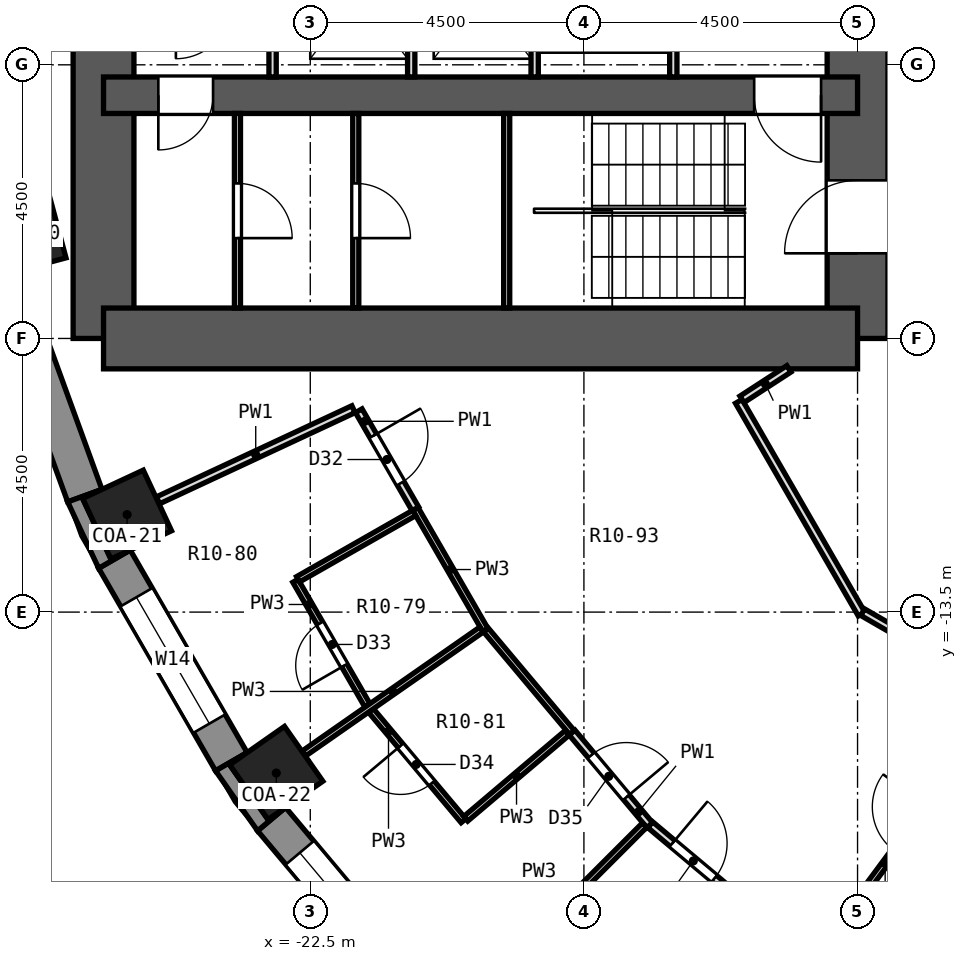
"""IFC4 building model, lengths in metres.
Left out: names, types, materials, properties, quantities, classifications, styles, units other than length and angle.
Written with IfcOpenShell. Run it as: python <this file> out.ifc"""

import sys

from ifc_helpers import new_model, si_unit, direction, frame, frame_2d, origin, origin_2d, place, context, subcontext, project, spatial, polyline, rectangle, outline, extrude, element, fill, save


model = new_model("IFC4")
c1 = context("Model", 3, precision=1e-05, world=origin(), true_north=direction((0.0, 1.0)))
c2 = subcontext(c1, "Body", "Model", "MODEL_VIEW")
j1 = project(units=[si_unit("LENGTHUNIT", "METRE"), si_unit("PLANEANGLEUNIT", "RADIAN")], contexts=[c1])
p1 = place(None, origin())
s1 = spatial("IfcSite", under=j1, at=p1, CompositionType="ELEMENT")
p2 = place(p1, origin())
s2 = spatial("IfcBuilding", under=s1, at=p2, CompositionType="ELEMENT")
p3 = place(p2, frame((0.0, 0.0, 36.2)))
s3 = spatial("IfcBuildingStorey", under=s2, at=p3, CompositionType="ELEMENT", Elevation=36.2)
for number, where, z_axis, x_axis in (
    (1, (-27.191, -7.286, 0.0), (0.0, 0.0, 1.0), (-0.966, -0.259, 0.0)),
    (2, (-25.512, -11.897, 0.0), (0.0, 0.0, 1.0), (-0.906, -0.423, 0.0)),
    (3, (-23.059, -16.146, 0.0), (0.0, 0.0, 1.0), (-0.819, -0.574, 0.0)),
):
    element("IfcColumn", number, at=place(p3, frame(where, z_axis=z_axis, x_axis=x_axis)), inside=s3, PredefinedType="COLUMN", context=c2, shape_type="SweptSolid", body=[
        extrude(rectangle(XDim=1.1, YDim=1.1, at=origin_2d()), origin(), (0.0, 0.0, 1.0), 3.3),
    ])
p4 = place(p3, frame((-13.5, -9.0, 0.0), z_axis=(0.0, 0.0, 1.0), x_axis=(0.0, 1.0, 0.0)))
e4 = element("IfcWall", 4, at=p4, inside=s3, PredefinedType="SHEAR", context=c2, shape_type="SweptSolid", body=[
    extrude(rectangle(XDim=18.0, YDim=1.0, at=frame_2d((9.0, 0.0))), origin(), (0.0, 0.0, 1.0), 3.3),
])
p5 = place(p4, frame((15.4, 0.0, 0.0)))
e5 = element("IfcOpeningElement", 5, at=p5, cuts=e4, PredefinedType="OPENING", context=c2, shape_type="SweptSolid", body=[
    extrude(rectangle(XDim=1.2, YDim=2.1, at=frame_2d((0.6, 1.05))), frame((0.0, 0.512, 0.0), z_axis=(0.0, -1.0, 0.0), x_axis=(1.0, 0.0, 0.0)), (0.0, 0.0, 1.0), 1.024),
])
p6 = place(p4, frame((1.4, 0.0, 0.0)))
e6 = element("IfcOpeningElement", 6, at=p6, cuts=e4, PredefinedType="OPENING", context=c2, shape_type="SweptSolid", body=[
    extrude(rectangle(XDim=1.2, YDim=2.1, at=frame_2d((0.6, 1.05))), frame((0.0, 0.512, 0.0), z_axis=(0.0, -1.0, 0.0), x_axis=(1.0, 0.0, 0.0)), (0.0, 0.0, 1.0), 1.024),
])
p7 = place(p4, frame((7.5, 0.0, 0.0)))
e7 = element("IfcOpeningElement", 7, at=p7, cuts=e4, PredefinedType="OPENING", context=c2, shape_type="SweptSolid", body=[
    extrude(rectangle(XDim=3.0, YDim=2.4, at=frame_2d((1.5, 1.2))), frame((0.0, 0.512, 0.0), z_axis=(0.0, -1.0, 0.0), x_axis=(1.0, 0.0, 0.0)), (0.0, 0.0, 1.0), 1.024),
])
p8 = place(p3, frame((-25.9, -9.0, 0.0), z_axis=(0.0, 0.0, 1.0), x_axis=(0.0, 1.0, 0.0)))
e8 = element("IfcWall", 8, at=p8, inside=s3, PredefinedType="SHEAR", context=c2, shape_type="SweptSolid", body=[
    extrude(rectangle(XDim=18.0, YDim=1.0, at=frame_2d((9.0, 0.0))), origin(), (0.0, 0.0, 1.0), 3.3),
])
p9 = place(p3, frame((-13.5, -9.0, 0.0), z_axis=(0.0, 0.0, 1.0), x_axis=(-1.0, 0.0, 0.0)))
e9 = element("IfcWall", 9, at=p9, inside=s3, PredefinedType="SHEAR", context=c2, shape_type="SweptSolid", body=[
    extrude(rectangle(XDim=12.4, YDim=1.0, at=frame_2d((6.2, 0.0))), origin(), (0.0, 0.0, 1.0), 3.3),
])
p10 = place(p3, frame((-13.5, -5.0, 0.0), z_axis=(0.0, 0.0, 1.0), x_axis=(-1.0, 0.0, 0.0)))
e10 = element("IfcWall", 10, at=p10, inside=s3, PredefinedType="SHEAR", context=c2, shape_type="SweptSolid", body=[
    extrude(rectangle(XDim=12.4, YDim=0.6, at=frame_2d((6.2, 0.0))), origin(), (0.0, 0.0, 1.0), 3.3),
])
p11 = place(p10, frame((10.599, 0.0, 0.0)))
e11 = element("IfcOpeningElement", 11, at=p11, cuts=e10, PredefinedType="OPENING", context=c2, shape_type="SweptSolid", body=[
    extrude(rectangle(XDim=0.9, YDim=2.1, at=frame_2d((0.45, 1.05))), frame((0.0, 0.312, 0.0), z_axis=(0.0, -1.0, 0.0), x_axis=(1.0, 0.0, 0.0)), (0.0, 0.0, 1.0), 0.624),
])
p12 = place(p10, frame((0.6, 0.0, 0.0)))
e12 = element("IfcOpeningElement", 12, at=p12, cuts=e10, PredefinedType="OPENING", context=c2, shape_type="SweptSolid", body=[
    extrude(rectangle(XDim=1.1, YDim=2.1, at=frame_2d((0.55, 1.05))), frame((0.0, 0.312, 0.0), z_axis=(0.0, -1.0, 0.0), x_axis=(1.0, 0.0, 0.0)), (0.0, 0.0, 1.0), 0.624),
])
p13 = place(p3, frame((-27.523, -7.971, 0.0), z_axis=(0.0, 0.0, 1.0), x_axis=(0.342028474173, -0.939689588564, 0.0)))
e13 = element("IfcWall", 13, at=p13, inside=s3, PredefinedType="SOLIDWALL", context=c2, shape_type="SweptSolid", body=[
    extrude(rectangle(XDim=3.846, YDim=0.6, at=frame_2d((1.923, 0.0))), origin(), (0.0, 0.0, 1.0), 2.75),
])
p14 = place(p3, frame((-25.721, -12.63, 0.0), z_axis=(0.0, 0.0, 1.0), x_axis=(0.499989888488, -0.86603124159, 0.0)))
e14 = element("IfcWall", 14, at=p14, inside=s3, PredefinedType="SOLIDWALL", context=c2, shape_type="SweptSolid", body=[
    extrude(rectangle(XDim=3.846, YDim=0.6, at=frame_2d((1.923, 0.0))), origin(), (0.0, 0.0, 1.0), 2.75),
])
p15 = place(p14, frame((0.723, 0.0, 0.9)))
e15 = element("IfcOpeningElement", 15, at=p15, cuts=e14, PredefinedType="OPENING", context=c2, shape_type="SweptSolid", body=[
    extrude(rectangle(XDim=2.4, YDim=1.8, at=frame_2d((1.2, 0.9))), frame((0.0, 0.312, 0.0), z_axis=(0.0, -1.0, 0.0), x_axis=(1.0, 0.0, 0.0)), (0.0, 0.0, 1.0), 0.624),
])
p16 = place(p3, frame((-23.137, -16.904, 0.0), z_axis=(0.0, 0.0, 1.0), x_axis=(0.642809392687, -0.766026164483, 0.0)))
e16 = element("IfcWall", 16, at=p16, inside=s3, PredefinedType="SOLIDWALL", context=c2, shape_type="SweptSolid", body=[
    extrude(rectangle(XDim=3.846, YDim=0.6, at=frame_2d((1.923, 0.0))), origin(), (0.0, 0.0, 1.0), 2.75),
])
p17 = place(p16, frame((0.723, 0.0, 0.9)))
e17 = element("IfcOpeningElement", 17, at=p17, cuts=e16, PredefinedType="OPENING", context=c2, shape_type="SweptSolid", body=[
    extrude(rectangle(XDim=2.4, YDim=1.8, at=frame_2d((1.2, 0.9))), frame((0.0, 0.312, 0.0), z_axis=(0.0, -1.0, 0.0), x_axis=(1.0, 0.0, 0.0)), (0.0, 0.0, 1.0), 0.624),
])
p18 = place(p3, origin())
e18 = element("IfcWall", 18, at=p18, inside=s3, PredefinedType="SOLIDWALL", context=c2, shape_type="SweptSolid", body=[
    extrude(outline(polyline([(-25.981, -12.78), (-25.461, -12.479), (-25.779, -12.628), (-26.243, -11.631), (-25.926, -11.483), (-26.49, -11.688), (-25.981, -12.78)])), origin(), (0.0, 0.0, 1.0), 2.75),
])
p19 = place(p3, origin())
e19 = element("IfcWall", 19, at=p19, inside=s3, PredefinedType="SOLIDWALL", context=c2, shape_type="SweptSolid", body=[
    extrude(outline(polyline([(-24.058, -16.11), (-23.367, -17.097), (-22.907, -16.711), (-23.194, -16.912), (-23.825, -16.011), (-23.538, -15.81), (-24.058, -16.11)])), origin(), (0.0, 0.0, 1.0), 2.75),
])
p20 = place(p3, frame((-22.744, -12.985, 0.0), z_axis=(0.0, 0.0, 1.0), x_axis=(0.499987246797, -0.866032766724, 0.0)))
e20 = element("IfcWall", 20, at=p20, inside=s3, PredefinedType="PARTITIONING", context=c2, shape_type="SweptSolid", body=[
    extrude(rectangle(XDim=2.368, YDim=0.1, at=frame_2d((1.184, 0.0))), origin(), (0.0, 0.0, 1.0), 2.75),
])
p21 = place(p20, frame((0.809, 0.0, 0.0)))
e21 = element("IfcOpeningElement", 21, at=p21, cuts=e20, PredefinedType="OPENING", context=c2, shape_type="SweptSolid", body=[
    extrude(rectangle(XDim=0.8, YDim=2.1, at=frame_2d((0.4, 1.05))), frame((0.0, 0.062, 0.0), z_axis=(0.0, -1.0, 0.0), x_axis=(1.0, 0.0, 0.0)), (0.0, 0.0, 1.0), 0.124),
])
p22 = place(p3, frame((-20.772, -11.802, 0.0), z_axis=(0.0, 0.0, 1.0), x_axis=(0.500055369823, -0.865993433642, 0.0)))
e22 = element("IfcWall", 22, at=p22, inside=s3, PredefinedType="PARTITIONING", context=c2, shape_type="SweptSolid", body=[
    extrude(rectangle(XDim=2.306, YDim=0.1, at=frame_2d((1.153, 0.0))), origin(), (0.0, 0.0, 1.0), 2.75),
])
p23 = place(p3, frame((-21.703, -10.189, 0.0), z_axis=(0.0, 0.0, 1.0), x_axis=(0.499862453367, -0.866104801807, 0.0)))
e23 = element("IfcWall", 23, at=p23, inside=s3, PredefinedType="PARTITIONING", context=c2, shape_type="SweptSolid", body=[
    extrude(rectangle(XDim=1.862, YDim=0.125, at=frame_2d((0.931, 0.0))), origin(), (0.0, 0.0, 1.0), 2.75),
])
p24 = place(p23, frame((0.476, 0.0, 0.0)))
e24 = element("IfcOpeningElement", 24, at=p24, cuts=e23, PredefinedType="OPENING", context=c2, shape_type="SweptSolid", body=[
    extrude(rectangle(XDim=0.9, YDim=2.1, at=frame_2d((0.45, 1.05))), frame((0.0, 0.074, 0.0), z_axis=(0.0, -1.0, 0.0), x_axis=(1.0, 0.0, 0.0)), (0.0, 0.0, 1.0), 0.149),
])
p25 = place(p3, frame((-15.453, -10.035, 0.0), z_axis=(0.0, 0.0, 1.0), x_axis=(0.499949220301, -0.866054719472, 0.0)))
e25 = element("IfcWall", 25, at=p25, inside=s3, PredefinedType="PARTITIONING", context=c2, shape_type="SweptSolid", body=[
    extrude(rectangle(XDim=4.039, YDim=0.125, at=frame_2d((2.019, 0.0))), origin(), (0.0, 0.0, 1.0), 2.75),
])
p26 = place(p3, frame((-21.503, -15.117, 0.0), z_axis=(0.0, 0.0, 1.0), x_axis=(0.642807507344, -0.766027746561, 0.0)))
e26 = element("IfcWall", 26, at=p26, inside=s3, PredefinedType="PARTITIONING", context=c2, shape_type="SweptSolid", body=[
    extrude(rectangle(XDim=2.368, YDim=0.1, at=frame_2d((1.184, 0.0))), origin(), (0.0, 0.0, 1.0), 2.75),
])
p27 = place(p26, frame((0.759, 0.0, 0.0)))
e27 = element("IfcOpeningElement", 27, at=p27, cuts=e26, PredefinedType="OPENING", context=c2, shape_type="SweptSolid", body=[
    extrude(rectangle(XDim=0.8, YDim=2.1, at=frame_2d((0.4, 1.05))), frame((0.0, 0.062, 0.0), z_axis=(0.0, -1.0, 0.0), x_axis=(1.0, 0.0, 0.0)), (0.0, 0.0, 1.0), 0.124),
])
p28 = place(p3, frame((-19.612, -13.793, 0.0), z_axis=(0.0, 0.0, 1.0), x_axis=(0.642989550085, -0.765874949637, 0.0)))
e28 = element("IfcWall", 28, at=p28, inside=s3, PredefinedType="PARTITIONING", context=c2, shape_type="SweptSolid", body=[
    extrude(rectangle(XDim=2.205, YDim=0.1, at=frame_2d((1.103, 0.0))), origin(), (0.0, 0.0, 1.0), 2.75),
])
p29 = place(p3, frame((-18.194, -15.482, 0.0), z_axis=(0.0, 0.0, 1.0), x_axis=(0.642633191675, -0.766173988698, 0.0)))
e29 = element("IfcWall", 29, at=p29, inside=s3, PredefinedType="PARTITIONING", context=c2, shape_type="SweptSolid", body=[
    extrude(rectangle(XDim=1.988, YDim=0.125, at=frame_2d((0.994, 0.0))), origin(), (0.0, 0.0, 1.0), 2.75),
])
p30 = place(p29, frame((0.487, 0.0, 0.0)))
e30 = element("IfcOpeningElement", 30, at=p30, cuts=e29, PredefinedType="OPENING", context=c2, shape_type="SweptSolid", body=[
    extrude(rectangle(XDim=0.9, YDim=2.1, at=frame_2d((0.45, 1.05))), frame((0.0, 0.074, 0.0), z_axis=(0.0, -1.0, 0.0), x_axis=(1.0, 0.0, 0.0)), (0.0, 0.0, 1.0), 0.149),
])
p31 = place(p3, frame((-16.909, -16.997, 0.0), z_axis=(0.0, 0.0, 1.0), x_axis=(0.766154061521, -0.642656948935, 0.0)))
e31 = element("IfcWall", 31, at=p31, inside=s3, PredefinedType="PARTITIONING", context=c2, shape_type="SweptSolid", body=[
    extrude(rectangle(XDim=1.862, YDim=0.125, at=frame_2d((0.931, 0.0))), origin(), (0.0, 0.0, 1.0), 2.75),
])
p32 = place(p31, frame((0.475, 0.0, 0.0)))
e32 = element("IfcOpeningElement", 32, at=p32, cuts=e31, PredefinedType="OPENING", context=c2, shape_type="SweptSolid", body=[
    extrude(rectangle(XDim=0.9, YDim=2.1, at=frame_2d((0.45, 1.05))), frame((0.0, 0.074, 0.0), z_axis=(0.0, -1.0, 0.0), x_axis=(1.0, 0.0, 0.0)), (0.0, 0.0, 1.0), 0.149),
])
p33 = place(p3, frame((-13.416, -13.501, 0.0), z_axis=(0.0, 0.0, 1.0), x_axis=(0.86605048973, -0.49995654735, 0.0)))
e33 = element("IfcWall", 33, at=p33, inside=s3, PredefinedType="PARTITIONING", context=c2, shape_type="SweptSolid", body=[
    extrude(rectangle(XDim=9.871, YDim=0.125, at=frame_2d((4.935, 0.0))), origin(), (0.0, 0.0, 1.0), 2.75),
])
p34 = place(p33, frame((2.938, 0.0, 0.0)))
e34 = element("IfcOpeningElement", 34, at=p34, cuts=e33, PredefinedType="OPENING", context=c2, shape_type="SweptSolid", body=[
    extrude(rectangle(XDim=0.8, YDim=2.1, at=frame_2d((0.4, 1.05))), frame((0.0, 0.074, 0.0), z_axis=(0.0, -1.0, 0.0), x_axis=(1.0, 0.0, 0.0)), (0.0, 0.0, 1.0), 0.149),
])
p35 = place(p3, frame((-25.004, -11.662, 0.0), z_axis=(0.0, 0.0, 1.0), x_axis=(0.906357161772, 0.422512361127, 0.0)))
e35 = element("IfcWall", 35, at=p35, inside=s3, PredefinedType="PARTITIONING", context=c2, shape_type="SweptSolid", body=[
    extrude(rectangle(XDim=3.547, YDim=0.125, at=frame_2d((1.773, 0.0))), origin(), (0.0, 0.0, 1.0), 2.75),
])
p36 = place(p3, frame((-22.701, -12.96, 0.0), z_axis=(0.0, 0.0, 1.0), x_axis=(0.86847529617, 0.495732447942, 0.0)))
e36 = element("IfcWall", 36, at=p36, inside=s3, PredefinedType="PARTITIONING", context=c2, shape_type="SweptSolid", body=[
    extrude(rectangle(XDim=2.199, YDim=0.1, at=frame_2d((1.1, 0.0))), origin(), (0.0, 0.0, 1.0), 2.75),
])
p37 = place(p3, frame((-15.401, -10.001, 0.0), z_axis=(0.0, 0.0, 1.0), x_axis=(0.838764779401, 0.544493934619, 0.0)))
e37 = element("IfcWall", 37, at=p37, inside=s3, PredefinedType="PARTITIONING", context=c2, shape_type="SweptSolid", body=[
    extrude(rectangle(XDim=0.92, YDim=0.125, at=frame_2d((0.46, 0.0))), origin(), (0.0, 0.0, 1.0), 2.75),
])
p38 = place(p3, frame((-22.602, -15.823, 0.0), z_axis=(0.0, 0.0, 1.0), x_axis=(0.820194321254, 0.57208502461, 0.0)))
e38 = element("IfcWall", 38, at=p38, inside=s3, PredefinedType="PARTITIONING", context=c2, shape_type="SweptSolid", body=[
    extrude(rectangle(XDim=3.559, YDim=0.1, at=frame_2d((1.78, 0.0))), origin(), (0.0, 0.0, 1.0), 2.75),
])
p39 = place(p3, frame((-19.943, -16.899, 0.0), z_axis=(0.0, 0.0, 1.0), x_axis=(0.762954369322, 0.646452341887, 0.0)))
e39 = element("IfcWall", 39, at=p39, inside=s3, PredefinedType="PARTITIONING", context=c2, shape_type="SweptSolid", body=[
    extrude(rectangle(XDim=2.188, YDim=0.1, at=frame_2d((1.094, 0.0))), origin(), (0.0, 0.0, 1.0), 2.75),
])
p40 = place(p3, frame((-19.509, -19.509, 0.0), z_axis=(0.0, 0.0, 1.0), x_axis=(0.707106781187, 0.707106781187, 0.0)))
e40 = element("IfcWall", 40, at=p40, inside=s3, PredefinedType="PARTITIONING", context=c2, shape_type="SweptSolid", body=[
    extrude(rectangle(XDim=3.547, YDim=0.1, at=frame_2d((1.773, 0.0))), origin(), (0.0, 0.0, 1.0), 2.75),
])
p41 = place(p3, frame((-14.207, -19.199, 0.0), z_axis=(0.0, 0.0, 1.0), x_axis=(0.595318943931, 0.80348948655, 0.0)))
e41 = element("IfcWall", 41, at=p41, inside=s3, PredefinedType="PARTITIONING", context=c2, shape_type="SweptSolid", body=[
    extrude(rectangle(XDim=5.302, YDim=0.1, at=frame_2d((2.651, 0.0))), origin(), (0.0, 0.0, 1.0), 2.75),
])
p42 = place(p41, frame((2.207, 0.0, 0.0)))
e42 = element("IfcOpeningElement", 42, at=p42, cuts=e41, PredefinedType="OPENING", context=c2, shape_type="SweptSolid", body=[
    extrude(rectangle(XDim=0.9, YDim=2.1, at=frame_2d((0.45, 1.05))), frame((0.0, 0.062, 0.0), z_axis=(0.0, -1.0, 0.0), x_axis=(1.0, 0.0, 0.0)), (0.0, 0.0, 1.0), 0.124),
])
p43 = place(p3, frame((-16.53, -4.7, 0.0), z_axis=(0.0, 0.0, 1.0), x_axis=(0.0, 1.0, 0.0)))
e43 = element("IfcWall", 43, at=p43, inside=s3, PredefinedType="PARTITIONING", context=c2, shape_type="SweptSolid", body=[
    extrude(rectangle(XDim=2.4, YDim=0.12, at=frame_2d((1.2, 0.0))), origin(), (0.0, 0.0, 1.0), 2.75),
])
p44 = place(p43, frame((0.65, 0.0, 0.0)))
e44 = element("IfcOpeningElement", 44, at=p44, cuts=e43, PredefinedType="OPENING", context=c2, shape_type="SweptSolid", body=[
    extrude(rectangle(XDim=1.1, YDim=2.1, at=frame_2d((0.55, 1.05))), frame((0.0, 0.072, 0.0), z_axis=(0.0, -1.0, 0.0), x_axis=(1.0, 0.0, 0.0)), (0.0, 0.0, 1.0), 0.144),
])
for number, where, z_axis, x_axis in (
    (45, (-18.81, -4.7, 0.0), (0.0, 0.0, 1.0), (0.0, 1.0, 0.0)),
    (46, (-20.84, -4.7, 0.0), (0.0, 0.0, 1.0), (0.0, 1.0, 0.0)),
    (47, (-23.12, -4.7, 0.0), (0.0, 0.0, 1.0), (0.0, 1.0, 0.0)),
):
    element("IfcWall", number, at=place(p3, frame(where, z_axis=z_axis, x_axis=x_axis)), inside=s3, PredefinedType="PARTITIONING", context=c2, shape_type="SweptSolid", body=[
        extrude(rectangle(XDim=2.4, YDim=0.12, at=frame_2d((1.2, 0.0))), origin(), (0.0, 0.0, 1.0), 2.75),
    ])
p45 = place(p3, frame((-19.27, -8.5, 0.0), z_axis=(0.0, 0.0, 1.0), x_axis=(0.0, 1.0, 0.0)))
e48 = element("IfcWall", 48, at=p45, inside=s3, PredefinedType="PARTITIONING", context=c2, shape_type="SweptSolid", body=[
    extrude(rectangle(XDim=3.2, YDim=0.1, at=frame_2d((1.6, 0.0))), origin(), (0.0, 0.0, 1.0), 2.75),
])
p46 = place(p3, frame((-21.752, -8.5, 0.0), z_axis=(0.0, 0.0, 1.0), x_axis=(0.0, 1.0, 0.0)))
e49 = element("IfcWall", 49, at=p46, inside=s3, PredefinedType="PARTITIONING", context=c2, shape_type="SweptSolid", body=[
    extrude(rectangle(XDim=3.2, YDim=0.1, at=frame_2d((1.6, 0.0))), origin(), (0.0, 0.0, 1.0), 2.75),
])
p47 = place(p46, frame((1.15, 0.0, 0.0)))
e50 = element("IfcOpeningElement", 50, at=p47, cuts=e49, PredefinedType="OPENING", context=c2, shape_type="SweptSolid", body=[
    extrude(rectangle(XDim=0.9, YDim=2.1, at=frame_2d((0.45, 1.05))), frame((0.0, 0.062, 0.0), z_axis=(0.0, -1.0, 0.0), x_axis=(1.0, 0.0, 0.0)), (0.0, 0.0, 1.0), 0.124),
])
p48 = place(p3, frame((-23.698, -8.5, 0.0), z_axis=(0.0, 0.0, 1.0), x_axis=(0.0, 1.0, 0.0)))
e51 = element("IfcWall", 51, at=p48, inside=s3, PredefinedType="PARTITIONING", context=c2, shape_type="SweptSolid", body=[
    extrude(rectangle(XDim=3.2, YDim=0.1, at=frame_2d((1.6, 0.0))), origin(), (0.0, 0.0, 1.0), 2.75),
])
p49 = place(p48, frame((1.15, 0.0, 0.0)))
e52 = element("IfcOpeningElement", 52, at=p49, cuts=e51, PredefinedType="OPENING", context=c2, shape_type="SweptSolid", body=[
    extrude(rectangle(XDim=0.9, YDim=2.1, at=frame_2d((0.45, 1.05))), frame((0.0, 0.062, 0.0), z_axis=(0.0, -1.0, 0.0), x_axis=(1.0, 0.0, 0.0)), (0.0, 0.0, 1.0), 0.124),
])
p50 = place(p15, origin())
e53 = element("IfcWindow", 53, at=p50, inside=s3, PartitioningType="SINGLE_PANEL", PredefinedType="WINDOW", context=c2, shape_type="SweptSolid", body=[
    extrude(rectangle(XDim=2.4, YDim=1.8, at=frame_2d((1.2, 0.9))), frame((0.0, 0.18, 0.0), z_axis=(0.0, -1.0, 0.0), x_axis=(1.0, 0.0, 0.0)), (0.0, 0.0, 1.0), 0.06),
])
fill(e15, e53)
p51 = place(p17, origin())
e54 = element("IfcWindow", 54, at=p51, inside=s3, PartitioningType="SINGLE_PANEL", PredefinedType="WINDOW", context=c2, shape_type="SweptSolid", body=[
    extrude(rectangle(XDim=2.4, YDim=1.8, at=frame_2d((1.2, 0.9))), frame((0.0, 0.18, 0.0), z_axis=(0.0, -1.0, 0.0), x_axis=(1.0, 0.0, 0.0)), (0.0, 0.0, 1.0), 0.06),
])
fill(e17, e54)
p52 = place(p24, origin())
e55 = element("IfcDoor", 55, at=p52, inside=s3, OperationType="SINGLE_SWING_LEFT", PredefinedType="DOOR", context=c2, shape_type="SweptSolid", body=[
    extrude(rectangle(XDim=0.9, YDim=2.1, at=frame_2d((0.45, 1.05))), frame((0.0, 0.025, 0.0), z_axis=(0.0, -1.0, 0.0), x_axis=(1.0, 0.0, 0.0)), (0.0, 0.0, 1.0), 0.05),
])
fill(e24, e55)
p53 = place(p21, frame((0.8, 0.0, 0.0), z_axis=(0.0, 0.0, 1.0), x_axis=(-1.0, 0.0, 0.0)))
e56 = element("IfcDoor", 56, at=p53, inside=s3, OperationType="SINGLE_SWING_LEFT", PredefinedType="DOOR", context=c2, shape_type="SweptSolid", body=[
    extrude(rectangle(XDim=0.8, YDim=2.1, at=frame_2d((0.4, 1.05))), frame((0.0, 0.025, 0.0), z_axis=(0.0, -1.0, 0.0), x_axis=(1.0, 0.0, 0.0)), (0.0, 0.0, 1.0), 0.05),
])
fill(e21, e56)
p54 = place(p27, frame((0.8, 0.0, 0.0), z_axis=(0.0, 0.0, 1.0), x_axis=(-1.0, 0.0, 0.0)))
e57 = element("IfcDoor", 57, at=p54, inside=s3, OperationType="SINGLE_SWING_RIGHT", PredefinedType="DOOR", context=c2, shape_type="SweptSolid", body=[
    extrude(rectangle(XDim=0.8, YDim=2.1, at=frame_2d((0.4, 1.05))), frame((0.0, 0.025, 0.0), z_axis=(0.0, -1.0, 0.0), x_axis=(1.0, 0.0, 0.0)), (0.0, 0.0, 1.0), 0.05),
])
fill(e27, e57)
p55 = place(p30, origin())
e58 = element("IfcDoor", 58, at=p55, inside=s3, OperationType="SINGLE_SWING_RIGHT", PredefinedType="DOOR", context=c2, shape_type="SweptSolid", body=[
    extrude(rectangle(XDim=0.9, YDim=2.1, at=frame_2d((0.45, 1.05))), frame((0.0, 0.025, 0.0), z_axis=(0.0, -1.0, 0.0), x_axis=(1.0, 0.0, 0.0)), (0.0, 0.0, 1.0), 0.05),
])
fill(e30, e58)
p56 = place(p32, origin())
e59 = element("IfcDoor", 59, at=p56, inside=s3, OperationType="SINGLE_SWING_LEFT", PredefinedType="DOOR", context=c2, shape_type="SweptSolid", body=[
    extrude(rectangle(XDim=0.9, YDim=2.1, at=frame_2d((0.45, 1.05))), frame((0.0, 0.025, 0.0), z_axis=(0.0, -1.0, 0.0), x_axis=(1.0, 0.0, 0.0)), (0.0, 0.0, 1.0), 0.05),
])
fill(e32, e59)
p57 = place(p49, frame((0.9, 0.0, 0.0), z_axis=(0.0, 0.0, 1.0), x_axis=(-1.0, 0.0, 0.0)))
e60 = element("IfcDoor", 60, at=p57, inside=s3, OperationType="SINGLE_SWING_RIGHT", PredefinedType="DOOR", context=c2, shape_type="SweptSolid", body=[
    extrude(rectangle(XDim=0.9, YDim=2.1, at=frame_2d((0.45, 1.05))), frame((0.0, 0.025, 0.0), z_axis=(0.0, -1.0, 0.0), x_axis=(1.0, 0.0, 0.0)), (0.0, 0.0, 1.0), 0.05),
])
fill(e52, e60)
p58 = place(p47, frame((0.9, 0.0, 0.0), z_axis=(0.0, 0.0, 1.0), x_axis=(-1.0, 0.0, 0.0)))
e61 = element("IfcDoor", 61, at=p58, inside=s3, OperationType="SINGLE_SWING_RIGHT", PredefinedType="DOOR", context=c2, shape_type="SweptSolid", body=[
    extrude(rectangle(XDim=0.9, YDim=2.1, at=frame_2d((0.45, 1.05))), frame((0.0, 0.025, 0.0), z_axis=(0.0, -1.0, 0.0), x_axis=(1.0, 0.0, 0.0)), (0.0, 0.0, 1.0), 0.05),
])
fill(e50, e61)
p59 = place(p11, origin())
e62 = element("IfcDoor", 62, at=p59, inside=s3, OperationType="SINGLE_SWING_RIGHT", PredefinedType="DOOR", context=c2, shape_type="SweptSolid", body=[
    extrude(rectangle(XDim=0.9, YDim=2.1, at=frame_2d((0.45, 1.05))), frame((0.0, 0.025, 0.0), z_axis=(0.0, -1.0, 0.0), x_axis=(1.0, 0.0, 0.0)), (0.0, 0.0, 1.0), 0.05),
])
fill(e11, e62)
p60 = place(p12, origin())
e63 = element("IfcDoor", 63, at=p60, inside=s3, OperationType="SINGLE_SWING_LEFT", PredefinedType="DOOR", context=c2, shape_type="SweptSolid", body=[
    extrude(rectangle(XDim=1.1, YDim=2.1, at=frame_2d((0.55, 1.05))), frame((0.0, 0.025, 0.0), z_axis=(0.0, -1.0, 0.0), x_axis=(1.0, 0.0, 0.0)), (0.0, 0.0, 1.0), 0.05),
])
fill(e12, e63)
p61 = place(p6, origin())
e64 = element("IfcDoor", 64, at=p61, inside=s3, OperationType="SINGLE_SWING_LEFT", PredefinedType="DOOR", context=c2, shape_type="SweptSolid", body=[
    extrude(rectangle(XDim=1.2, YDim=2.1, at=frame_2d((0.6, 1.05))), frame((0.0, 0.025, 0.0), z_axis=(0.0, -1.0, 0.0), x_axis=(1.0, 0.0, 0.0)), (0.0, 0.0, 1.0), 0.05),
])
fill(e6, e64)
save(model, sys.argv[1])
